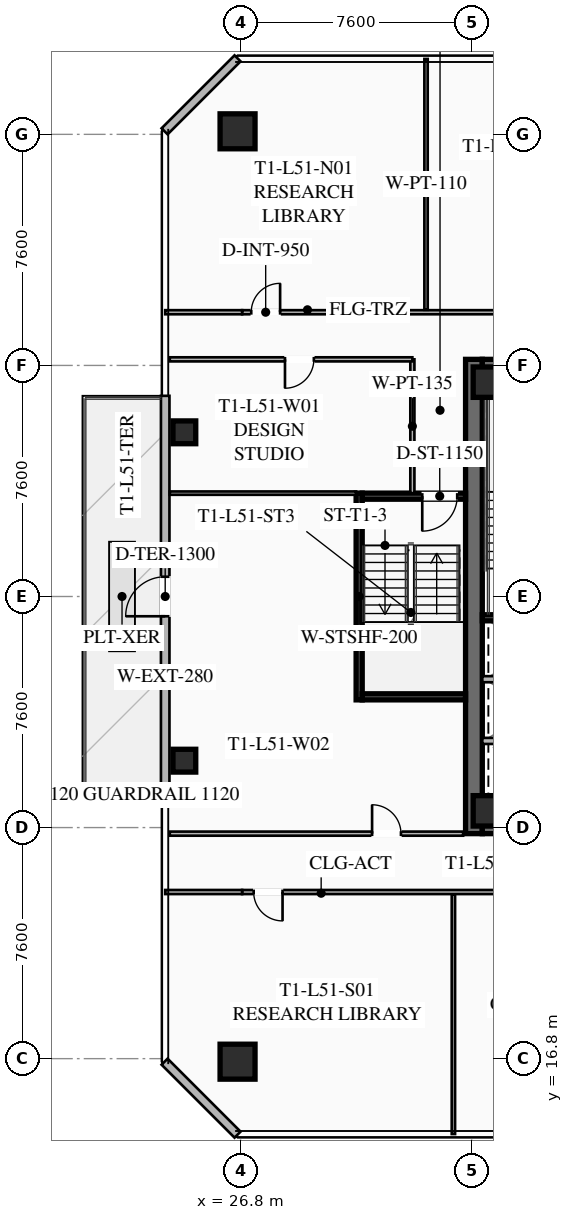
"""IFC4 building model, lengths in metres.
Left out: names, types, materials, properties, quantities, classifications, styles, units other than length and angle.
Written with IfcOpenShell. Run it as: python <this file> out.ifc"""

import sys

from ifc_helpers import new_model, si_unit, direction, frame, frame_2d, origin, origin_2d, place, context, subcontext, project, spatial, rectangle, hollow_rectangle, extrude, element, fill, save


model = new_model("IFC4")
c1 = context("Model", 3, precision=1e-05, world=origin(), true_north=direction((0.0, 1.0)))
c2 = subcontext(c1, "Body", "Model", "MODEL_VIEW")
j1 = project(units=[si_unit("LENGTHUNIT", "METRE"), si_unit("PLANEANGLEUNIT", "RADIAN")], contexts=[c1])
p1 = place(None, origin())
s1 = spatial("IfcSite", under=j1, at=p1, CompositionType="ELEMENT")
p2 = place(p1, origin())
s2 = spatial("IfcBuilding", under=s1, at=p2, CompositionType="ELEMENT")
p3 = place(p2, frame((0.0, 0.0, 188.95)))
s3 = spatial("IfcBuildingStorey", under=s2, at=p3, CompositionType="ELEMENT", Elevation=188.95)
p4 = place(p3, frame((34.475, 24.2, 0.0), z_axis=(0.0, 0.0, 1.0), x_axis=(0.0, 1.0, 0.0)))
e1 = element("IfcWall", 1, at=p4, inside=s3, PredefinedType="SHEAR", context=c2, shape_type="SweptSolid", body=[
    extrude(rectangle(XDim=15.6, YDim=0.55, at=frame_2d((7.8, 0.0))), origin(), (0.0, 0.0, 1.0), 3.55),
])
p5 = place(p3, frame((49.25, 24.475, 0.0), z_axis=(0.0, 0.0, 1.0), x_axis=(-1.0, 0.0, 0.0)))
e2 = element("IfcWall", 2, at=p5, inside=s3, PredefinedType="SHEAR", context=c2, shape_type="SweptSolid", body=[
    extrude(rectangle(XDim=14.5, YDim=0.55, at=frame_2d((7.25, 0.0))), origin(), (0.0, 0.0, 1.0), 3.55),
])
p6 = place(p5, frame((8.95, 0.0, 0.0)))
e3 = element("IfcOpeningElement", 3, at=p6, cuts=e2, PredefinedType="OPENING", context=c2, shape_type="SweptSolid", body=[
    extrude(rectangle(XDim=1.25, YDim=2.25, at=frame_2d((0.625, 1.125))), frame((0.0, 0.285, 0.0), z_axis=(0.0, -1.0, 0.0), x_axis=(1.0, 0.0, 0.0)), (0.0, 0.0, 1.0), 0.57),
])
p7 = place(p5, frame((3.9, 0.0, 0.0)))
e4 = element("IfcOpeningElement", 4, at=p7, cuts=e2, PredefinedType="OPENING", context=c2, shape_type="SweptSolid", body=[
    extrude(rectangle(XDim=1.25, YDim=2.25, at=frame_2d((0.625, 1.125))), frame((0.0, 0.285, 0.0), z_axis=(0.0, -1.0, 0.0), x_axis=(1.0, 0.0, 0.0)), (0.0, 0.0, 1.0), 0.57),
])
p8 = place(p3, frame((34.75, 39.525, 0.0), z_axis=(0.0, 0.0, 1.0), x_axis=(1.0, 0.0, 0.0)))
e5 = element("IfcWall", 5, at=p8, inside=s3, PredefinedType="SHEAR", context=c2, shape_type="SweptSolid", body=[
    extrude(rectangle(XDim=14.5, YDim=0.55, at=frame_2d((7.25, 0.0))), origin(), (0.0, 0.0, 1.0), 3.55),
])
p9 = place(p8, frame((4.3, 0.0, 0.0)))
e6 = element("IfcOpeningElement", 6, at=p9, cuts=e5, PredefinedType="OPENING", context=c2, shape_type="SweptSolid", body=[
    extrude(rectangle(XDim=1.25, YDim=2.25, at=frame_2d((0.625, 1.125))), frame((0.0, 0.285, 0.0), z_axis=(0.0, -1.0, 0.0), x_axis=(1.0, 0.0, 0.0)), (0.0, 0.0, 1.0), 0.57),
])
p10 = place(p8, frame((9.35, 0.0, 0.0)))
e7 = element("IfcOpeningElement", 7, at=p10, cuts=e5, PredefinedType="OPENING", context=c2, shape_type="SweptSolid", body=[
    extrude(rectangle(XDim=1.25, YDim=2.25, at=frame_2d((0.625, 1.125))), frame((0.0, 0.285, 0.0), z_axis=(0.0, -1.0, 0.0), x_axis=(1.0, 0.0, 0.0)), (0.0, 0.0, 1.0), 0.57),
])
for number, where, z_axis, x_axis in (
    (8, (34.95, 24.95, 0.0), (0.0, 0.0, 1.0), (1.0, 0.0, 0.0)),
    (9, (34.95, 39.05, 0.0), (0.0, 0.0, 1.0), (1.0, 0.0, 0.0)),
):
    element("IfcColumn", number, at=place(p3, frame(where, z_axis=z_axis, x_axis=x_axis)), inside=s3, PredefinedType="COLUMN", context=c2, shape_type="SweptSolid", body=[
        extrude(hollow_rectangle(XDim=1.0, YDim=1.0, WallThickness=0.04, at=origin_2d()), origin(), (0.0, 0.0, 1.0), 3.37),
    ])
for number, where, z_axis, x_axis in (
    (10, (26.7, 16.7, 0.0), (0.0, 0.0, 1.0), (1.0, 0.0, 0.0)),
    (11, (26.7, 47.3, 0.0), (0.0, 0.0, 1.0), (1.0, 0.0, 0.0)),
):
    element("IfcColumn", number, at=place(p3, frame(where, z_axis=z_axis, x_axis=x_axis)), inside=s3, PredefinedType="COLUMN", context=c2, shape_type="SweptSolid", body=[
        extrude(hollow_rectangle(XDim=1.15, YDim=1.15, WallThickness=0.045, at=origin_2d()), origin(), (0.0, 0.0, 1.0), 3.37),
    ])
for number, where, z_axis, x_axis in (
    (12, (24.95, 37.4, 0.0), (0.0, 0.0, 1.0), (1.0, 0.0, 0.0)),
    (13, (24.95, 26.6, 0.0), (0.0, 0.0, 1.0), (1.0, 0.0, 0.0)),
):
    element("IfcColumn", number, at=place(p3, frame(where, z_axis=z_axis, x_axis=x_axis)), inside=s3, PredefinedType="COLUMN", context=c2, shape_type="SweptSolid", body=[
        extrude(hollow_rectangle(XDim=0.75, YDim=0.75, WallThickness=0.032, at=origin_2d()), origin(), (0.0, 0.0, 1.0), 3.37),
    ])
p11 = place(p3, frame((24.32, 25.4, 0.0), z_axis=(0.0, 0.0, 1.0), x_axis=(0.0, 1.0, 0.0)))
e14 = element("IfcWall", 14, at=p11, inside=s3, PredefinedType="SOLIDWALL", context=c2, shape_type="SweptSolid", body=[
    extrude(rectangle(XDim=13.2, YDim=0.28, at=frame_2d((6.6, 0.0))), origin(), (0.0, 0.0, 1.0), 3.37),
])
p12 = place(p11, frame((5.95, 0.0, 0.0)))
e15 = element("IfcOpeningElement", 15, at=p12, cuts=e14, PredefinedType="OPENING", context=c2, shape_type="SweptSolid", body=[
    extrude(rectangle(XDim=1.3, YDim=2.15, at=frame_2d((0.65, 1.075))), frame((0.0, 0.15, 0.0), z_axis=(0.0, -1.0, 0.0), x_axis=(1.0, 0.0, 0.0)), (0.0, 0.0, 1.0), 0.3),
])
for number, where, z_axis, x_axis in (
    (16, (26.7, 14.3, 0.0), (0.0, 0.0, 1.0), (-0.707, 0.707, 0.0)),
    (17, (24.3, 47.3, 0.0), (0.0, 0.0, 1.0), (0.707, 0.707, 0.0)),
):
    element("IfcWall", number, at=place(p3, frame(where, z_axis=z_axis, x_axis=x_axis)), inside=s3, PredefinedType="SOLIDWALL", context=c2, shape_type="SweptSolid", body=[
        extrude(rectangle(XDim=3.394, YDim=0.28, at=frame_2d((1.697, 0.0))), origin(), (0.0, 0.0, 1.0), 3.37),
    ])
for number, where, z_axis, x_axis in (
    (18, (34.75, 31.3, 0.0), (0.0, 0.0, 1.0), (1.0, 0.0, 0.0)),
    (19, (34.75, 38.7, 0.0), (0.0, 0.0, 1.0), (1.0, 0.0, 0.0)),
):
    element("IfcWall", number, at=place(p3, frame(where, z_axis=z_axis, x_axis=x_axis)), inside=s3, PredefinedType="SHEAR", context=c2, shape_type="SweptSolid", body=[
        extrude(rectangle(XDim=3.55, YDim=0.2, at=frame_2d((1.775, 0.0))), origin(), (0.0, 0.0, 1.0), 3.37),
    ])
for number, where, z_axis, x_axis in (
    (20, (34.75, 27.25, 0.0), (0.0, 0.0, 1.0), (1.0, 0.0, 0.0)),
    (21, (34.75, 29.28, 0.0), (0.0, 0.0, 1.0), (1.0, 0.0, 0.0)),
):
    element("IfcWall", number, at=place(p3, frame(where, z_axis=z_axis, x_axis=x_axis)), inside=s3, PredefinedType="SOLIDWALL", context=c2, shape_type="SweptSolid", body=[
        extrude(rectangle(XDim=3.2, YDim=0.2, at=frame_2d((1.6, 0.0))), origin(), (0.0, 0.0, 1.0), 3.37),
    ])
p13 = place(p3, frame((30.7, 28.6, 0.0), z_axis=(0.0, 0.0, 1.0), x_axis=(0.0, 1.0, 0.0)))
e22 = element("IfcWall", 22, at=p13, inside=s3, PredefinedType="SHEAR", context=c2, shape_type="SweptSolid", body=[
    extrude(rectangle(XDim=6.8, YDim=0.2, at=frame_2d((3.4, 0.0))), origin(), (0.0, 0.0, 1.0), 3.37),
])
p14 = place(p3, frame((34.2, 35.3, 0.0), z_axis=(0.0, 0.0, 1.0), x_axis=(-1.0, 0.0, 0.0)))
e23 = element("IfcWall", 23, at=p14, inside=s3, PredefinedType="SHEAR", context=c2, shape_type="SweptSolid", body=[
    extrude(rectangle(XDim=3.4, YDim=0.2, at=frame_2d((1.7, 0.0))), origin(), (0.0, 0.0, 1.0), 3.37),
])
p15 = place(p14, frame((0.275, 0.0, 0.0)))
e24 = element("IfcOpeningElement", 24, at=p15, cuts=e23, PredefinedType="OPENING", context=c2, shape_type="SweptSolid", body=[
    extrude(rectangle(XDim=1.15, YDim=2.2, at=frame_2d((0.575, 1.1))), frame((0.0, 0.11, 0.0), z_axis=(0.0, -1.0, 0.0), x_axis=(1.0, 0.0, 0.0)), (0.0, 0.0, 1.0), 0.22),
])
p16 = place(p3, frame((30.8, 28.7, 0.0), z_axis=(0.0, 0.0, 1.0), x_axis=(1.0, 0.0, 0.0)))
e25 = element("IfcWall", 25, at=p16, inside=s3, PredefinedType="SHEAR", context=c2, shape_type="SweptSolid", body=[
    extrude(rectangle(XDim=3.4, YDim=0.2, at=frame_2d((1.7, 0.0))), origin(), (0.0, 0.0, 1.0), 3.37),
])
p17 = place(p3, frame((32.45, 35.4, 0.0), z_axis=(0.0, 0.0, 1.0), x_axis=(0.0, 1.0, 0.0)))
e26 = element("IfcWall", 26, at=p17, inside=s3, PredefinedType="PARTITIONING", context=c2, shape_type="SweptSolid", body=[
    extrude(rectangle(XDim=4.4, YDim=0.135, at=frame_2d((2.2, 0.0))), origin(), (0.0, 0.0, 1.0), 2.723),
])
p18 = place(p3, frame((26.85, 41.35, 0.0), z_axis=(0.0, 0.0, 1.0), x_axis=(1.0, 0.0, 0.0)))
e27 = element("IfcWall", 27, at=p18, inside=s3, PredefinedType="PARTITIONING", context=c2, shape_type="SweptSolid", body=[
    extrude(rectangle(XDim=30.3, YDim=0.135, at=frame_2d((15.15, 0.0))), origin(), (0.0, 0.0, 1.0), 2.723),
])
p19 = place(p18, frame((0.3, 0.0, 0.0)))
e28 = element("IfcOpeningElement", 28, at=p19, cuts=e27, PredefinedType="OPENING", context=c2, shape_type="SweptSolid", body=[
    extrude(rectangle(XDim=0.95, YDim=2.05, at=frame_2d((0.475, 1.025))), frame((0.0, 0.077, 0.0), z_axis=(0.0, -1.0, 0.0), x_axis=(1.0, 0.0, 0.0)), (0.0, 0.0, 1.0), 0.155),
])
p20 = place(p18, frame((10.62, 0.0, 0.0)))
e29 = element("IfcOpeningElement", 29, at=p20, cuts=e27, PredefinedType="OPENING", context=c2, shape_type="SweptSolid", body=[
    extrude(rectangle(XDim=0.95, YDim=2.05, at=frame_2d((0.475, 1.025))), frame((0.0, 0.077, 0.0), z_axis=(0.0, -1.0, 0.0), x_axis=(1.0, 0.0, 0.0)), (0.0, 0.0, 1.0), 0.155),
])
p21 = place(p18, frame((14.923, 0.0, 0.0)))
e30 = element("IfcOpeningElement", 30, at=p21, cuts=e27, PredefinedType="OPENING", context=c2, shape_type="SweptSolid", body=[
    extrude(rectangle(XDim=0.95, YDim=2.05, at=frame_2d((0.475, 1.025))), frame((0.0, 0.077, 0.0), z_axis=(0.0, -1.0, 0.0), x_axis=(1.0, 0.0, 0.0)), (0.0, 0.0, 1.0), 0.155),
])
p22 = place(p18, frame((18.728, 0.0, 0.0)))
e31 = element("IfcOpeningElement", 31, at=p22, cuts=e27, PredefinedType="OPENING", context=c2, shape_type="SweptSolid", body=[
    extrude(rectangle(XDim=0.95, YDim=2.05, at=frame_2d((0.475, 1.025))), frame((0.0, 0.077, 0.0), z_axis=(0.0, -1.0, 0.0), x_axis=(1.0, 0.0, 0.0)), (0.0, 0.0, 1.0), 0.155),
])
p23 = place(p18, frame((29.05, 0.0, 0.0)))
e32 = element("IfcOpeningElement", 32, at=p23, cuts=e27, PredefinedType="OPENING", context=c2, shape_type="SweptSolid", body=[
    extrude(rectangle(XDim=0.95, YDim=2.05, at=frame_2d((0.475, 1.025))), frame((0.0, 0.077, 0.0), z_axis=(0.0, -1.0, 0.0), x_axis=(1.0, 0.0, 0.0)), (0.0, 0.0, 1.0), 0.155),
])
p24 = place(p3, frame((24.32, 41.35, 0.0), z_axis=(0.0, 0.0, 1.0), x_axis=(1.0, 0.0, 0.0)))
e33 = element("IfcWall", 33, at=p24, inside=s3, PredefinedType="PARTITIONING", context=c2, shape_type="SweptSolid", body=[
    extrude(rectangle(XDim=2.53, YDim=0.135, at=frame_2d((1.265, 0.0))), origin(), (0.0, 0.0, 1.0), 2.723),
])
p25 = place(p3, frame((32.9, 41.43, 0.0), z_axis=(0.0, 0.0, 1.0), x_axis=(0.0, 1.0, 0.0)))
e34 = element("IfcWall", 34, at=p25, inside=s3, PredefinedType="PARTITIONING", context=c2, shape_type="SweptSolid", body=[
    extrude(rectangle(XDim=8.25, YDim=0.11, at=frame_2d((4.125, 0.0))), origin(), (0.0, 0.0, 1.0), 2.723),
])
p26 = place(p3, frame((57.15, 22.28, 0.0), z_axis=(0.0, 0.0, 1.0), x_axis=(-1.0, 0.0, 0.0)))
e35 = element("IfcWall", 35, at=p26, inside=s3, PredefinedType="PARTITIONING", context=c2, shape_type="SweptSolid", body=[
    extrude(rectangle(XDim=30.3, YDim=0.135, at=frame_2d((15.15, 0.0))), origin(), (0.0, 0.0, 1.0), 2.723),
])
p27 = place(p26, frame((28.97, 0.0, 0.0)))
e36 = element("IfcOpeningElement", 36, at=p27, cuts=e35, PredefinedType="OPENING", context=c2, shape_type="SweptSolid", body=[
    extrude(rectangle(XDim=0.95, YDim=2.05, at=frame_2d((0.475, 1.025))), frame((0.0, 0.077, 0.0), z_axis=(0.0, -1.0, 0.0), x_axis=(1.0, 0.0, 0.0)), (0.0, 0.0, 1.0), 0.155),
])
p28 = place(p26, frame((14.468, 0.0, 0.0)))
e37 = element("IfcOpeningElement", 37, at=p28, cuts=e35, PredefinedType="OPENING", context=c2, shape_type="SweptSolid", body=[
    extrude(rectangle(XDim=0.95, YDim=2.05, at=frame_2d((0.475, 1.025))), frame((0.0, 0.077, 0.0), z_axis=(0.0, -1.0, 0.0), x_axis=(1.0, 0.0, 0.0)), (0.0, 0.0, 1.0), 0.155),
])
p29 = place(p26, frame((0.38, 0.0, 0.0)))
e38 = element("IfcOpeningElement", 38, at=p29, cuts=e35, PredefinedType="OPENING", context=c2, shape_type="SweptSolid", body=[
    extrude(rectangle(XDim=0.95, YDim=2.05, at=frame_2d((0.475, 1.025))), frame((0.0, 0.077, 0.0), z_axis=(0.0, -1.0, 0.0), x_axis=(1.0, 0.0, 0.0)), (0.0, 0.0, 1.0), 0.155),
])
p30 = place(p3, frame((24.32, 22.28, 0.0), z_axis=(0.0, 0.0, 1.0), x_axis=(1.0, 0.0, 0.0)))
e39 = element("IfcWall", 39, at=p30, inside=s3, PredefinedType="PARTITIONING", context=c2, shape_type="SweptSolid", body=[
    extrude(rectangle(XDim=2.53, YDim=0.135, at=frame_2d((1.265, 0.0))), origin(), (0.0, 0.0, 1.0), 2.723),
])
p31 = place(p3, frame((33.8, 14.32, 0.0), z_axis=(0.0, 0.0, 1.0), x_axis=(0.0, 1.0, 0.0)))
e40 = element("IfcWall", 40, at=p31, inside=s3, PredefinedType="PARTITIONING", context=c2, shape_type="SweptSolid", body=[
    extrude(rectangle(XDim=7.88, YDim=0.11, at=frame_2d((3.94, 0.0))), origin(), (0.0, 0.0, 1.0), 2.723),
])
p32 = place(p3, frame((32.45, 39.8, 0.0), z_axis=(0.0, 0.0, 1.0), x_axis=(-1.0, 0.0, 0.0)))
e41 = element("IfcWall", 41, at=p32, inside=s3, PredefinedType="PARTITIONING", context=c2, shape_type="SweptSolid", body=[
    extrude(rectangle(XDim=7.98, YDim=0.135, at=frame_2d((3.99, 0.0))), origin(), (0.0, 0.0, 1.0), 2.723),
])
p33 = place(p32, frame((3.24, 0.0, 0.0)))
e42 = element("IfcOpeningElement", 42, at=p33, cuts=e41, PredefinedType="OPENING", context=c2, shape_type="SweptSolid", body=[
    extrude(rectangle(XDim=0.95, YDim=2.05, at=frame_2d((0.475, 1.025))), frame((0.0, 0.077, 0.0), z_axis=(0.0, -1.0, 0.0), x_axis=(1.0, 0.0, 0.0)), (0.0, 0.0, 1.0), 0.155),
])
p34 = place(p3, frame((24.47, 24.2, 0.0), z_axis=(0.0, 0.0, 1.0), x_axis=(1.0, 0.0, 0.0)))
e43 = element("IfcWall", 43, at=p34, inside=s3, PredefinedType="PARTITIONING", context=c2, shape_type="SweptSolid", body=[
    extrude(rectangle(XDim=9.65, YDim=0.135, at=frame_2d((4.825, 0.0))), origin(), (0.0, 0.0, 1.0), 2.723),
])
p35 = place(p34, frame((6.655, 0.0, 0.0)))
e44 = element("IfcOpeningElement", 44, at=p35, cuts=e43, PredefinedType="OPENING", context=c2, shape_type="SweptSolid", body=[
    extrude(rectangle(XDim=0.95, YDim=2.05, at=frame_2d((0.475, 1.025))), frame((0.0, 0.077, 0.0), z_axis=(0.0, -1.0, 0.0), x_axis=(1.0, 0.0, 0.0)), (0.0, 0.0, 1.0), 0.155),
])
p36 = place(p3, frame((30.6, 35.4, 0.0), z_axis=(0.0, 0.0, 1.0), x_axis=(-1.0, 0.0, 0.0)))
e45 = element("IfcWall", 45, at=p36, inside=s3, PredefinedType="PARTITIONING", context=c2, shape_type="SweptSolid", body=[
    extrude(rectangle(XDim=6.13, YDim=0.11, at=frame_2d((3.065, 0.0))), origin(), (0.0, 0.0, 1.0), 2.723),
])
p37 = place(p12, origin())
e46 = element("IfcDoor", 46, at=p37, inside=s3, OperationType="SINGLE_SWING_LEFT", PredefinedType="DOOR", context=c2, shape_type="SweptSolid", body=[
    extrude(rectangle(XDim=1.3, YDim=2.15, at=frame_2d((0.65, 1.075))), frame((0.0, 0.025, 0.0), z_axis=(0.0, -1.0, 0.0), x_axis=(1.0, 0.0, 0.0)), (0.0, 0.0, 1.0), 0.05),
])
fill(e15, e46)
p38 = place(p15, origin())
e47 = element("IfcDoor", 47, at=p38, inside=s3, OperationType="SINGLE_SWING_RIGHT", PredefinedType="DOOR", context=c2, shape_type="SweptSolid", body=[
    extrude(rectangle(XDim=1.15, YDim=2.2, at=frame_2d((0.575, 1.1))), frame((0.0, 0.025, 0.0), z_axis=(0.0, -1.0, 0.0), x_axis=(1.0, 0.0, 0.0)), (0.0, 0.0, 1.0), 0.05),
])
fill(e24, e47)
p39 = place(p19, origin())
e48 = element("IfcDoor", 48, at=p39, inside=s3, OperationType="SINGLE_SWING_RIGHT", PredefinedType="DOOR", context=c2, shape_type="SweptSolid", body=[
    extrude(rectangle(XDim=0.95, YDim=2.05, at=frame_2d((0.475, 1.025))), frame((0.0, 0.025, 0.0), z_axis=(0.0, -1.0, 0.0), x_axis=(1.0, 0.0, 0.0)), (0.0, 0.0, 1.0), 0.05),
])
fill(e28, e48)
p40 = place(p27, origin())
e49 = element("IfcDoor", 49, at=p40, inside=s3, OperationType="SINGLE_SWING_LEFT", PredefinedType="DOOR", context=c2, shape_type="SweptSolid", body=[
    extrude(rectangle(XDim=0.95, YDim=2.05, at=frame_2d((0.475, 1.025))), frame((0.0, 0.025, 0.0), z_axis=(0.0, -1.0, 0.0), x_axis=(1.0, 0.0, 0.0)), (0.0, 0.0, 1.0), 0.05),
])
fill(e36, e49)
p41 = place(p33, origin())
e50 = element("IfcDoor", 50, at=p41, inside=s3, OperationType="SINGLE_SWING_RIGHT", PredefinedType="DOOR", context=c2, shape_type="SweptSolid", body=[
    extrude(rectangle(XDim=0.95, YDim=2.05, at=frame_2d((0.475, 1.025))), frame((0.0, 0.025, 0.0), z_axis=(0.0, -1.0, 0.0), x_axis=(1.0, 0.0, 0.0)), (0.0, 0.0, 1.0), 0.05),
])
fill(e42, e50)
p42 = place(p35, origin())
e51 = element("IfcDoor", 51, at=p42, inside=s3, OperationType="SINGLE_SWING_LEFT", PredefinedType="DOOR", context=c2, shape_type="SweptSolid", body=[
    extrude(rectangle(XDim=0.95, YDim=2.05, at=frame_2d((0.475, 1.025))), frame((0.0, 0.025, 0.0), z_axis=(0.0, -1.0, 0.0), x_axis=(1.0, 0.0, 0.0)), (0.0, 0.0, 1.0), 0.05),
])
fill(e44, e51)
save(model, sys.argv[1])
